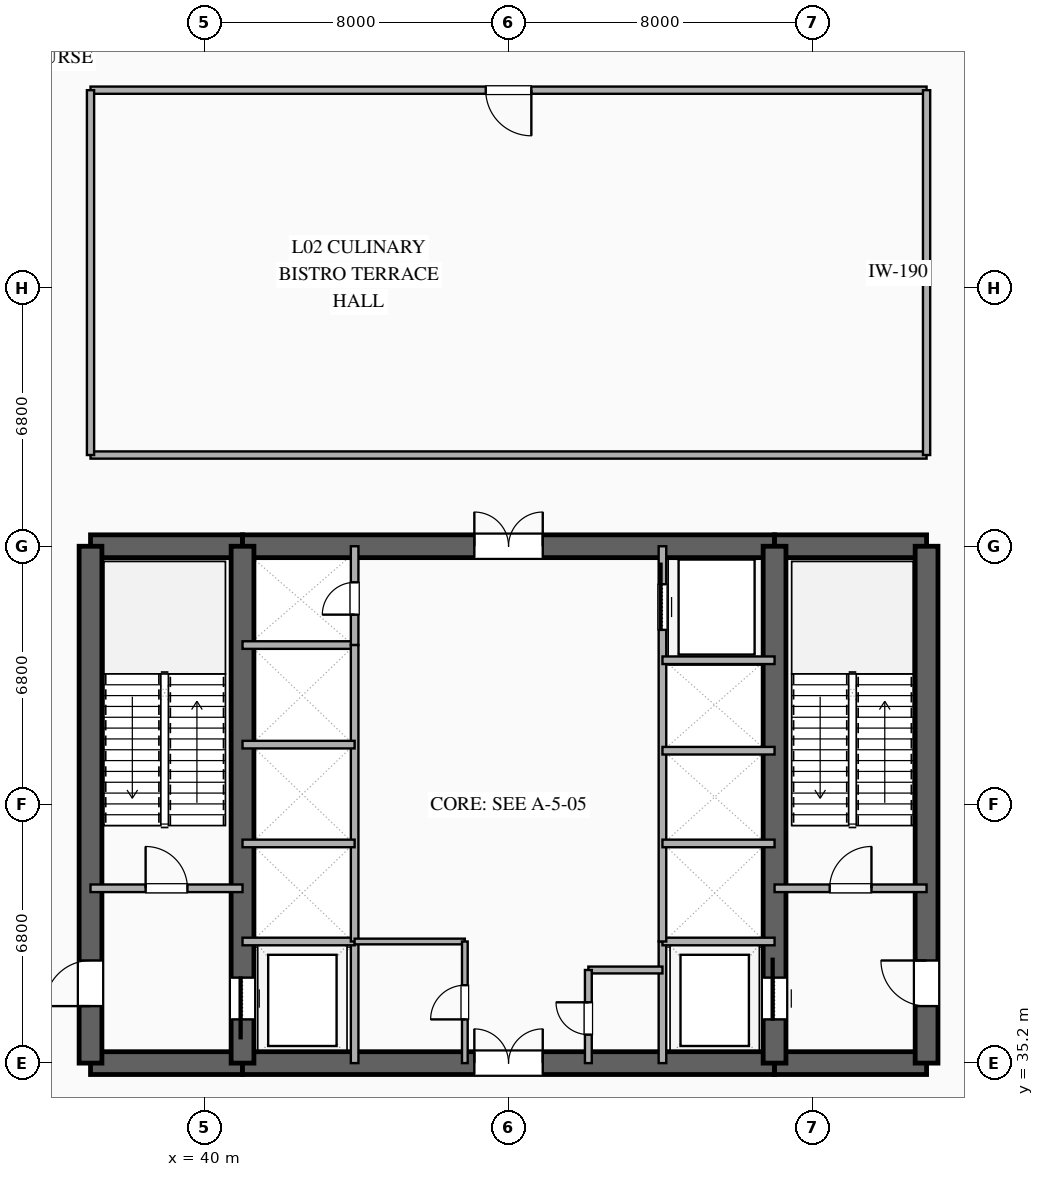
"""IFC4 building model, lengths in metres.
Left out: names, types, materials, properties, quantities, classifications, styles, units other than length and angle.
Written with IfcOpenShell. Run it as: python <this file> out.ifc"""

import sys

from ifc_helpers import new_model, si_unit, direction, frame, frame_2d, origin, place, context, subcontext, project, spatial, rectangle, extrude, element, fill, save


model = new_model("IFC4")
c1 = context("Model", 3, precision=1e-05, world=origin(), true_north=direction((0.0, 1.0)))
c2 = subcontext(c1, "Body", "Model", "MODEL_VIEW")
j1 = project(units=[si_unit("LENGTHUNIT", "METRE"), si_unit("PLANEANGLEUNIT", "RADIAN")], contexts=[c1])
p1 = place(None, origin())
s1 = spatial("IfcSite", under=j1, at=p1, CompositionType="ELEMENT")
p2 = place(p1, origin())
s2 = spatial("IfcBuilding", under=s1, at=p2, CompositionType="ELEMENT")
p3 = place(p2, frame((0.0, 0.0, 11.4)))
s3 = spatial("IfcBuildingStorey", under=s2, at=p3, CompositionType="ELEMENT", Elevation=11.4)
p4 = place(p3, frame((37.0, 35.2, 0.0), z_axis=(0.0, 0.0, 1.0), x_axis=(1.0, 0.0, 0.0)))
e1 = element("IfcWall", 1, at=p4, inside=s3, PredefinedType="SHEAR", context=c2, shape_type="SweptSolid", body=[
    extrude(rectangle(XDim=4.0, YDim=0.6, at=frame_2d((2.0, 0.0))), origin(), (0.0, 0.0, 1.0), 5.1),
])
p5 = place(p3, frame((41.0, 35.2, 0.0), z_axis=(0.0, 0.0, 1.0), x_axis=(1.0, 0.0, 0.0)))
e2 = element("IfcWall", 2, at=p5, inside=s3, PredefinedType="SHEAR", context=c2, shape_type="SweptSolid", body=[
    extrude(rectangle(XDim=14.0, YDim=0.6, at=frame_2d((7.0, 0.0))), origin(), (0.0, 0.0, 1.0), 5.1),
])
p6 = place(p5, frame((6.1, 0.0, 0.0)))
e3 = element("IfcOpeningElement", 3, at=p6, cuts=e2, PredefinedType="OPENING", context=c2, shape_type="SweptSolid", body=[
    extrude(rectangle(XDim=1.8, YDim=2.25, at=frame_2d((0.9, 1.125))), frame((0.0, 0.31, 0.0), z_axis=(0.0, -1.0, 0.0), x_axis=(1.0, 0.0, 0.0)), (0.0, 0.0, 1.0), 0.62),
])
for number, where, z_axis, x_axis in (
    (4, (55.0, 35.2, 0.0), (0.0, 0.0, 1.0), (1.0, 0.0, 0.0)),
    (5, (37.0, 48.8, 0.0), (0.0, 0.0, 1.0), (1.0, 0.0, 0.0)),
):
    element("IfcWall", number, at=place(p3, frame(where, z_axis=z_axis, x_axis=x_axis)), inside=s3, PredefinedType="SHEAR", context=c2, shape_type="SweptSolid", body=[
        extrude(rectangle(XDim=4.0, YDim=0.6, at=frame_2d((2.0, 0.0))), origin(), (0.0, 0.0, 1.0), 5.1),
    ])
p7 = place(p3, frame((41.0, 48.8, 0.0), z_axis=(0.0, 0.0, 1.0), x_axis=(1.0, 0.0, 0.0)))
e6 = element("IfcWall", 6, at=p7, inside=s3, PredefinedType="SHEAR", context=c2, shape_type="SweptSolid", body=[
    extrude(rectangle(XDim=14.0, YDim=0.6, at=frame_2d((7.0, 0.0))), origin(), (0.0, 0.0, 1.0), 5.1),
])
p8 = place(p7, frame((6.1, 0.0, 0.0)))
e7 = element("IfcOpeningElement", 7, at=p8, cuts=e6, PredefinedType="OPENING", context=c2, shape_type="SweptSolid", body=[
    extrude(rectangle(XDim=1.8, YDim=2.25, at=frame_2d((0.9, 1.125))), frame((0.0, 0.31, 0.0), z_axis=(0.0, -1.0, 0.0), x_axis=(1.0, 0.0, 0.0)), (0.0, 0.0, 1.0), 0.62),
])
p9 = place(p3, frame((55.0, 48.8, 0.0), z_axis=(0.0, 0.0, 1.0), x_axis=(1.0, 0.0, 0.0)))
e8 = element("IfcWall", 8, at=p9, inside=s3, PredefinedType="SHEAR", context=c2, shape_type="SweptSolid", body=[
    extrude(rectangle(XDim=4.0, YDim=0.6, at=frame_2d((2.0, 0.0))), origin(), (0.0, 0.0, 1.0), 5.1),
])
p10 = place(p3, frame((37.0, 35.2, 0.0), z_axis=(0.0, 0.0, 1.0), x_axis=(0.0, 1.0, 0.0)))
e9 = element("IfcWall", 9, at=p10, inside=s3, PredefinedType="SHEAR", context=c2, shape_type="SweptSolid", body=[
    extrude(rectangle(XDim=13.6, YDim=0.6, at=frame_2d((6.8, 0.0))), origin(), (0.0, 0.0, 1.0), 5.1),
])
p11 = place(p10, frame((1.5, 0.0, 0.0)))
e10 = element("IfcOpeningElement", 10, at=p11, cuts=e9, PredefinedType="OPENING", context=c2, shape_type="SweptSolid", body=[
    extrude(rectangle(XDim=1.2, YDim=2.15, at=frame_2d((0.6, 1.075))), frame((0.0, 0.31, 0.0), z_axis=(0.0, -1.0, 0.0), x_axis=(1.0, 0.0, 0.0)), (0.0, 0.0, 1.0), 0.62),
])
p12 = place(p3, frame((59.0, 35.2, 0.0), z_axis=(0.0, 0.0, 1.0), x_axis=(0.0, 1.0, 0.0)))
e11 = element("IfcWall", 11, at=p12, inside=s3, PredefinedType="SHEAR", context=c2, shape_type="SweptSolid", body=[
    extrude(rectangle(XDim=13.6, YDim=0.6, at=frame_2d((6.8, 0.0))), origin(), (0.0, 0.0, 1.0), 5.1),
])
p13 = place(p12, frame((1.5, 0.0, 0.0)))
e12 = element("IfcOpeningElement", 12, at=p13, cuts=e11, PredefinedType="OPENING", context=c2, shape_type="SweptSolid", body=[
    extrude(rectangle(XDim=1.2, YDim=2.15, at=frame_2d((0.6, 1.075))), frame((0.0, 0.31, 0.0), z_axis=(0.0, -1.0, 0.0), x_axis=(1.0, 0.0, 0.0)), (0.0, 0.0, 1.0), 0.62),
])
p14 = place(p3, frame((41.0, 35.2, 0.0), z_axis=(0.0, 0.0, 1.0), x_axis=(0.0, 1.0, 0.0)))
e13 = element("IfcWall", 13, at=p14, inside=s3, PredefinedType="SHEAR", context=c2, shape_type="SweptSolid", body=[
    extrude(rectangle(XDim=13.6, YDim=0.6, at=frame_2d((6.8, 0.0))), origin(), (0.0, 0.0, 1.0), 5.1),
])
p15 = place(p14, frame((1.15, 0.0, 0.0)))
e14 = element("IfcOpeningElement", 14, at=p15, cuts=e13, PredefinedType="OPENING", context=c2, shape_type="SweptSolid", body=[
    extrude(rectangle(XDim=1.1, YDim=2.2, at=frame_2d((0.55, 1.1))), frame((0.0, 0.31, 0.0), z_axis=(0.0, -1.0, 0.0), x_axis=(1.0, 0.0, 0.0)), (0.0, 0.0, 1.0), 0.62),
])
p16 = place(p3, frame((55.0, 35.2, 0.0), z_axis=(0.0, 0.0, 1.0), x_axis=(0.0, 1.0, 0.0)))
e15 = element("IfcWall", 15, at=p16, inside=s3, PredefinedType="SHEAR", context=c2, shape_type="SweptSolid", body=[
    extrude(rectangle(XDim=13.6, YDim=0.6, at=frame_2d((6.8, 0.0))), origin(), (0.0, 0.0, 1.0), 5.1),
])
p17 = place(p16, frame((1.15, 0.0, 0.0)))
e16 = element("IfcOpeningElement", 16, at=p17, cuts=e15, PredefinedType="OPENING", context=c2, shape_type="SweptSolid", body=[
    extrude(rectangle(XDim=1.1, YDim=2.2, at=frame_2d((0.55, 1.1))), frame((0.0, 0.31, 0.0), z_axis=(0.0, -1.0, 0.0), x_axis=(1.0, 0.0, 0.0)), (0.0, 0.0, 1.0), 0.62),
])
p18 = place(p3, frame((37.0, 39.8, 0.0), z_axis=(0.0, 0.0, 1.0), x_axis=(1.0, 0.0, 0.0)))
e17 = element("IfcWall", 17, at=p18, inside=s3, PredefinedType="SOLIDWALL", context=c2, shape_type="SweptSolid", body=[
    extrude(rectangle(XDim=4.0, YDim=0.2, at=frame_2d((2.0, 0.0))), origin(), (0.0, 0.0, 1.0), 4.3),
])
p19 = place(p18, frame((1.45, 0.0, 0.0)))
e18 = element("IfcOpeningElement", 18, at=p19, cuts=e17, PredefinedType="OPENING", context=c2, shape_type="SweptSolid", body=[
    extrude(rectangle(XDim=1.1, YDim=2.15, at=frame_2d((0.55, 1.075))), frame((0.0, 0.11, 0.0), z_axis=(0.0, -1.0, 0.0), x_axis=(1.0, 0.0, 0.0)), (0.0, 0.0, 1.0), 0.22),
])
p20 = place(p3, frame((55.0, 39.8, 0.0), z_axis=(0.0, 0.0, 1.0), x_axis=(1.0, 0.0, 0.0)))
e19 = element("IfcWall", 19, at=p20, inside=s3, PredefinedType="SOLIDWALL", context=c2, shape_type="SweptSolid", body=[
    extrude(rectangle(XDim=4.0, YDim=0.2, at=frame_2d((2.0, 0.0))), origin(), (0.0, 0.0, 1.0), 4.3),
])
p21 = place(p20, frame((1.45, 0.0, 0.0)))
e20 = element("IfcOpeningElement", 20, at=p21, cuts=e19, PredefinedType="OPENING", context=c2, shape_type="SweptSolid", body=[
    extrude(rectangle(XDim=1.1, YDim=2.15, at=frame_2d((0.55, 1.075))), frame((0.0, 0.11, 0.0), z_axis=(0.0, -1.0, 0.0), x_axis=(1.0, 0.0, 0.0)), (0.0, 0.0, 1.0), 0.22),
])
p22 = place(p3, frame((43.95, 35.2, 0.0), z_axis=(0.0, 0.0, 1.0), x_axis=(0.0, 1.0, 0.0)))
e21 = element("IfcWall", 21, at=p22, inside=s3, PredefinedType="SOLIDWALL", context=c2, shape_type="SweptSolid", body=[
    extrude(rectangle(XDim=3.2, YDim=0.2, at=frame_2d((1.6, 0.0))), origin(), (0.0, 0.0, 1.0), 4.3),
])
p23 = place(p3, frame((41.0, 38.4, 0.0), z_axis=(0.0, 0.0, 1.0), x_axis=(1.0, 0.0, 0.0)))
e22 = element("IfcWall", 22, at=p23, inside=s3, PredefinedType="SOLIDWALL", context=c2, shape_type="SweptSolid", body=[
    extrude(rectangle(XDim=2.95, YDim=0.2, at=frame_2d((1.475, 0.0))), origin(), (0.0, 0.0, 1.0), 4.3),
])
p24 = place(p3, frame((52.05, 35.2, 0.0), z_axis=(0.0, 0.0, 1.0), x_axis=(0.0, 1.0, 0.0)))
e23 = element("IfcWall", 23, at=p24, inside=s3, PredefinedType="SOLIDWALL", context=c2, shape_type="SweptSolid", body=[
    extrude(rectangle(XDim=3.2, YDim=0.2, at=frame_2d((1.6, 0.0))), origin(), (0.0, 0.0, 1.0), 4.3),
])
for number, where, z_axis, x_axis in (
    (24, (52.05, 38.4, 0.0), (0.0, 0.0, 1.0), (1.0, 0.0, 0.0)),
    (25, (41.0, 46.2, 0.0), (0.0, 0.0, 1.0), (1.0, 0.0, 0.0)),
):
    element("IfcWall", number, at=place(p3, frame(where, z_axis=z_axis, x_axis=x_axis)), inside=s3, PredefinedType="SOLIDWALL", context=c2, shape_type="SweptSolid", body=[
        extrude(rectangle(XDim=2.95, YDim=0.2, at=frame_2d((1.475, 0.0))), origin(), (0.0, 0.0, 1.0), 4.3),
    ])
p25 = place(p3, frame((43.95, 46.2, 0.0), z_axis=(0.0, 0.0, 1.0), x_axis=(0.0, 1.0, 0.0)))
e26 = element("IfcWall", 26, at=p25, inside=s3, PredefinedType="SOLIDWALL", context=c2, shape_type="SweptSolid", body=[
    extrude(rectangle(XDim=2.6, YDim=0.2, at=frame_2d((1.3, 0.0))), origin(), (0.0, 0.0, 1.0), 4.3),
])
p26 = place(p25, frame((0.8, 0.0, 0.0)))
e27 = element("IfcOpeningElement", 27, at=p26, cuts=e26, PredefinedType="OPENING", context=c2, shape_type="SweptSolid", body=[
    extrude(rectangle(XDim=0.85, YDim=2.15, at=frame_2d((0.425, 1.075))), frame((0.0, 0.11, 0.0), z_axis=(0.0, -1.0, 0.0), x_axis=(1.0, 0.0, 0.0)), (0.0, 0.0, 1.0), 0.22),
])
p27 = place(p3, frame((43.95, 38.4, 0.0), z_axis=(0.0, 0.0, 1.0), x_axis=(0.0, 1.0, 0.0)))
e28 = element("IfcWall", 28, at=p27, inside=s3, PredefinedType="SOLIDWALL", context=c2, shape_type="SweptSolid", body=[
    extrude(rectangle(XDim=7.8, YDim=0.2, at=frame_2d((3.9, 0.0))), origin(), (0.0, 0.0, 1.0), 4.3),
])
for number, where, z_axis, x_axis in (
    (29, (41.0, 40.98, 0.0), (0.0, 0.0, 1.0), (1.0, 0.0, 0.0)),
    (30, (41.0, 43.58, 0.0), (0.0, 0.0, 1.0), (1.0, 0.0, 0.0)),
):
    element("IfcWall", number, at=place(p3, frame(where, z_axis=z_axis, x_axis=x_axis)), inside=s3, PredefinedType="SOLIDWALL", context=c2, shape_type="SweptSolid", body=[
        extrude(rectangle(XDim=2.95, YDim=0.2, at=frame_2d((1.475, 0.0))), origin(), (0.0, 0.0, 1.0), 4.3),
    ])
p28 = place(p3, frame((52.05, 38.4, 0.0), z_axis=(0.0, 0.0, 1.0), x_axis=(0.0, 1.0, 0.0)))
e31 = element("IfcWall", 31, at=p28, inside=s3, PredefinedType="SOLIDWALL", context=c2, shape_type="SweptSolid", body=[
    extrude(rectangle(XDim=10.4, YDim=0.2, at=frame_2d((5.2, 0.0))), origin(), (0.0, 0.0, 1.0), 4.3),
])
p29 = place(p28, frame((8.2, 0.0, 0.0)))
e32 = element("IfcOpeningElement", 32, at=p29, cuts=e31, PredefinedType="OPENING", context=c2, shape_type="SweptSolid", body=[
    extrude(rectangle(XDim=1.2, YDim=2.2, at=frame_2d((0.6, 1.1))), frame((0.0, 0.11, 0.0), z_axis=(0.0, -1.0, 0.0), x_axis=(1.0, 0.0, 0.0)), (0.0, 0.0, 1.0), 0.22),
])
for number, where, z_axis, x_axis in (
    (33, (52.05, 40.98, 0.0), (0.0, 0.0, 1.0), (1.0, 0.0, 0.0)),
    (34, (52.05, 43.42, 0.0), (0.0, 0.0, 1.0), (1.0, 0.0, 0.0)),
    (35, (52.05, 45.8, 0.0), (0.0, 0.0, 1.0), (1.0, 0.0, 0.0)),
):
    element("IfcWall", number, at=place(p3, frame(where, z_axis=z_axis, x_axis=x_axis)), inside=s3, PredefinedType="SOLIDWALL", context=c2, shape_type="SweptSolid", body=[
        extrude(rectangle(XDim=2.95, YDim=0.2, at=frame_2d((1.475, 0.0))), origin(), (0.0, 0.0, 1.0), 4.3),
    ])
p30 = place(p3, frame((43.95, 38.4, 0.0), z_axis=(0.0, 0.0, 1.0), x_axis=(1.0, 0.0, 0.0)))
e36 = element("IfcWall", 36, at=p30, inside=s3, PredefinedType="PARTITIONING", context=c2, shape_type="SweptSolid", body=[
    extrude(rectangle(XDim=2.9, YDim=0.15, at=frame_2d((1.45, 0.0))), origin(), (0.0, 0.0, 1.0), 4.3),
])
p31 = place(p3, frame((46.85, 35.2, 0.0), z_axis=(0.0, 0.0, 1.0), x_axis=(0.0, 1.0, 0.0)))
e37 = element("IfcWall", 37, at=p31, inside=s3, PredefinedType="PARTITIONING", context=c2, shape_type="SweptSolid", body=[
    extrude(rectangle(XDim=3.2, YDim=0.15, at=frame_2d((1.6, 0.0))), origin(), (0.0, 0.0, 1.0), 4.3),
])
p32 = place(p31, frame((1.15, 0.0, 0.0)))
e38 = element("IfcOpeningElement", 38, at=p32, cuts=e37, PredefinedType="OPENING", context=c2, shape_type="SweptSolid", body=[
    extrude(rectangle(XDim=0.9, YDim=2.15, at=frame_2d((0.45, 1.075))), frame((0.0, 0.085, 0.0), z_axis=(0.0, -1.0, 0.0), x_axis=(1.0, 0.0, 0.0)), (0.0, 0.0, 1.0), 0.17),
])
p33 = place(p3, frame((50.1, 37.65, 0.0), z_axis=(0.0, 0.0, 1.0), x_axis=(1.0, 0.0, 0.0)))
e39 = element("IfcWall", 39, at=p33, inside=s3, PredefinedType="PLUMBINGWALL", context=c2, shape_type="SweptSolid", body=[
    extrude(rectangle(XDim=1.95, YDim=0.18, at=frame_2d((0.975, 0.0))), origin(), (0.0, 0.0, 1.0), 4.3),
])
p34 = place(p3, frame((50.1, 35.2, 0.0), z_axis=(0.0, 0.0, 1.0), x_axis=(0.0, 1.0, 0.0)))
e40 = element("IfcWall", 40, at=p34, inside=s3, PredefinedType="PLUMBINGWALL", context=c2, shape_type="SweptSolid", body=[
    extrude(rectangle(XDim=2.45, YDim=0.18, at=frame_2d((1.225, 0.0))), origin(), (0.0, 0.0, 1.0), 4.3),
])
p35 = place(p34, frame((0.75, 0.0, 0.0)))
e41 = element("IfcOpeningElement", 41, at=p35, cuts=e40, PredefinedType="OPENING", context=c2, shape_type="SweptSolid", body=[
    extrude(rectangle(XDim=0.85, YDim=2.1, at=frame_2d((0.425, 1.05))), frame((0.0, 0.1, 0.0), z_axis=(0.0, -1.0, 0.0), x_axis=(1.0, 0.0, 0.0)), (0.0, 0.0, 1.0), 0.2),
])
p36 = place(p3, frame((59.0, 60.8, 0.0), z_axis=(0.0, 0.0, 1.0), x_axis=(-1.0, 0.0, 0.0)))
e42 = element("IfcWall", 42, at=p36, inside=s3, PredefinedType="PARTITIONING", context=c2, shape_type="SweptSolid", body=[
    extrude(rectangle(XDim=22.0, YDim=0.19, at=frame_2d((11.0, 0.0))), origin(), (0.0, 0.0, 1.0), 4.3),
])
p37 = place(p36, frame((10.4, 0.0, 0.0)))
e43 = element("IfcOpeningElement", 43, at=p37, cuts=e42, PredefinedType="OPENING", context=c2, shape_type="SweptSolid", body=[
    extrude(rectangle(XDim=1.2, YDim=2.25, at=frame_2d((0.6, 1.125))), frame((0.0, 0.105, 0.0), z_axis=(0.0, -1.0, 0.0), x_axis=(1.0, 0.0, 0.0)), (0.0, 0.0, 1.0), 0.21),
])
p38 = place(p3, frame((37.0, 51.2, 0.0), z_axis=(0.0, 0.0, 1.0), x_axis=(1.0, 0.0, 0.0)))
e44 = element("IfcWall", 44, at=p38, inside=s3, PredefinedType="PARTITIONING", context=c2, shape_type="SweptSolid", body=[
    extrude(rectangle(XDim=22.0, YDim=0.19, at=frame_2d((11.0, 0.0))), origin(), (0.0, 0.0, 1.0), 4.3),
])
for number, where, z_axis, x_axis in (
    (45, (59.0, 51.2, 0.0), (0.0, 0.0, 1.0), (0.0, 1.0, 0.0)),
    (46, (37.0, 60.8, 0.0), (0.0, 0.0, 1.0), (0.0, -1.0, 0.0)),
):
    element("IfcWall", number, at=place(p3, frame(where, z_axis=z_axis, x_axis=x_axis)), inside=s3, PredefinedType="PARTITIONING", context=c2, shape_type="SweptSolid", body=[
        extrude(rectangle(XDim=9.6, YDim=0.19, at=frame_2d((4.8, 0.0))), origin(), (0.0, 0.0, 1.0), 4.3),
    ])
p39 = place(p15, origin())
e47 = element("IfcDoor", 47, at=p39, inside=s3, OperationType="SLIDING_TO_LEFT", PredefinedType="DOOR", context=c2, shape_type="SweptSolid", body=[
    extrude(rectangle(XDim=1.1, YDim=2.2, at=frame_2d((0.55, 1.1))), frame((0.0, 0.025, 0.0), z_axis=(0.0, -1.0, 0.0), x_axis=(1.0, 0.0, 0.0)), (0.0, 0.0, 1.0), 0.05),
])
fill(e14, e47)
p40 = place(p17, origin())
e48 = element("IfcDoor", 48, at=p40, inside=s3, OperationType="SLIDING_TO_RIGHT", PredefinedType="DOOR", context=c2, shape_type="SweptSolid", body=[
    extrude(rectangle(XDim=1.1, YDim=2.2, at=frame_2d((0.55, 1.1))), frame((0.0, 0.025, 0.0), z_axis=(0.0, -1.0, 0.0), x_axis=(1.0, 0.0, 0.0)), (0.0, 0.0, 1.0), 0.05),
])
fill(e16, e48)
p41 = place(p11, origin())
e49 = element("IfcDoor", 49, at=p41, inside=s3, OperationType="SINGLE_SWING_LEFT", PredefinedType="DOOR", context=c2, shape_type="SweptSolid", body=[
    extrude(rectangle(XDim=1.2, YDim=2.15, at=frame_2d((0.6, 1.075))), frame((0.0, 0.025, 0.0), z_axis=(0.0, -1.0, 0.0), x_axis=(1.0, 0.0, 0.0)), (0.0, 0.0, 1.0), 0.05),
])
fill(e10, e49)
p42 = place(p13, origin())
e50 = element("IfcDoor", 50, at=p42, inside=s3, OperationType="SINGLE_SWING_RIGHT", PredefinedType="DOOR", context=c2, shape_type="SweptSolid", body=[
    extrude(rectangle(XDim=1.2, YDim=2.15, at=frame_2d((0.6, 1.075))), frame((0.0, 0.025, 0.0), z_axis=(0.0, -1.0, 0.0), x_axis=(1.0, 0.0, 0.0)), (0.0, 0.0, 1.0), 0.05),
])
fill(e12, e50)
p43 = place(p6, origin())
e51 = element("IfcDoor", 51, at=p43, inside=s3, OperationType="DOUBLE_DOOR_SINGLE_SWING", PredefinedType="DOOR", context=c2, shape_type="SweptSolid", body=[
    extrude(rectangle(XDim=1.8, YDim=2.25, at=frame_2d((0.9, 1.125))), frame((0.0, 0.025, 0.0), z_axis=(0.0, -1.0, 0.0), x_axis=(1.0, 0.0, 0.0)), (0.0, 0.0, 1.0), 0.05),
])
fill(e3, e51)
p44 = place(p8, origin())
e52 = element("IfcDoor", 52, at=p44, inside=s3, OperationType="DOUBLE_DOOR_SINGLE_SWING", PredefinedType="DOOR", context=c2, shape_type="SweptSolid", body=[
    extrude(rectangle(XDim=1.8, YDim=2.25, at=frame_2d((0.9, 1.125))), frame((0.0, 0.025, 0.0), z_axis=(0.0, -1.0, 0.0), x_axis=(1.0, 0.0, 0.0)), (0.0, 0.0, 1.0), 0.05),
])
fill(e7, e52)
p45 = place(p19, origin())
e53 = element("IfcDoor", 53, at=p45, inside=s3, OperationType="SINGLE_SWING_LEFT", PredefinedType="DOOR", context=c2, shape_type="SweptSolid", body=[
    extrude(rectangle(XDim=1.1, YDim=2.15, at=frame_2d((0.55, 1.075))), frame((0.0, 0.025, 0.0), z_axis=(0.0, -1.0, 0.0), x_axis=(1.0, 0.0, 0.0)), (0.0, 0.0, 1.0), 0.05),
])
fill(e18, e53)
p46 = place(p21, origin())
e54 = element("IfcDoor", 54, at=p46, inside=s3, OperationType="SINGLE_SWING_RIGHT", PredefinedType="DOOR", context=c2, shape_type="SweptSolid", body=[
    extrude(rectangle(XDim=1.1, YDim=2.15, at=frame_2d((0.55, 1.075))), frame((0.0, 0.025, 0.0), z_axis=(0.0, -1.0, 0.0), x_axis=(1.0, 0.0, 0.0)), (0.0, 0.0, 1.0), 0.05),
])
fill(e20, e54)
p47 = place(p26, origin())
e55 = element("IfcDoor", 55, at=p47, inside=s3, OperationType="SINGLE_SWING_LEFT", PredefinedType="DOOR", context=c2, shape_type="SweptSolid", body=[
    extrude(rectangle(XDim=0.85, YDim=2.15, at=frame_2d((0.425, 1.075))), frame((0.0, 0.025, 0.0), z_axis=(0.0, -1.0, 0.0), x_axis=(1.0, 0.0, 0.0)), (0.0, 0.0, 1.0), 0.05),
])
fill(e27, e55)
p48 = place(p29, origin())
e56 = element("IfcDoor", 56, at=p48, inside=s3, OperationType="SLIDING_TO_RIGHT", PredefinedType="DOOR", context=c2, shape_type="SweptSolid", body=[
    extrude(rectangle(XDim=1.2, YDim=2.2, at=frame_2d((0.6, 1.1))), frame((0.0, 0.025, 0.0), z_axis=(0.0, -1.0, 0.0), x_axis=(1.0, 0.0, 0.0)), (0.0, 0.0, 1.0), 0.05),
])
fill(e32, e56)
p49 = place(p32, origin())
e57 = element("IfcDoor", 57, at=p49, inside=s3, OperationType="SINGLE_SWING_LEFT", PredefinedType="DOOR", context=c2, shape_type="SweptSolid", body=[
    extrude(rectangle(XDim=0.9, YDim=2.15, at=frame_2d((0.45, 1.075))), frame((0.0, 0.025, 0.0), z_axis=(0.0, -1.0, 0.0), x_axis=(1.0, 0.0, 0.0)), (0.0, 0.0, 1.0), 0.05),
])
fill(e38, e57)
p50 = place(p35, origin())
e58 = element("IfcDoor", 58, at=p50, inside=s3, OperationType="SINGLE_SWING_RIGHT", PredefinedType="DOOR", context=c2, shape_type="SweptSolid", body=[
    extrude(rectangle(XDim=0.85, YDim=2.1, at=frame_2d((0.425, 1.05))), frame((0.0, 0.025, 0.0), z_axis=(0.0, -1.0, 0.0), x_axis=(1.0, 0.0, 0.0)), (0.0, 0.0, 1.0), 0.05),
])
fill(e41, e58)
p51 = place(p37, origin())
e59 = element("IfcDoor", 59, at=p51, inside=s3, OperationType="SINGLE_SWING_LEFT", PredefinedType="DOOR", context=c2, shape_type="SweptSolid", body=[
    extrude(rectangle(XDim=1.2, YDim=2.25, at=frame_2d((0.6, 1.125))), frame((0.0, 0.025, 0.0), z_axis=(0.0, -1.0, 0.0), x_axis=(1.0, 0.0, 0.0)), (0.0, 0.0, 1.0), 0.05),
])
fill(e43, e59)
save(model, sys.argv[1])
